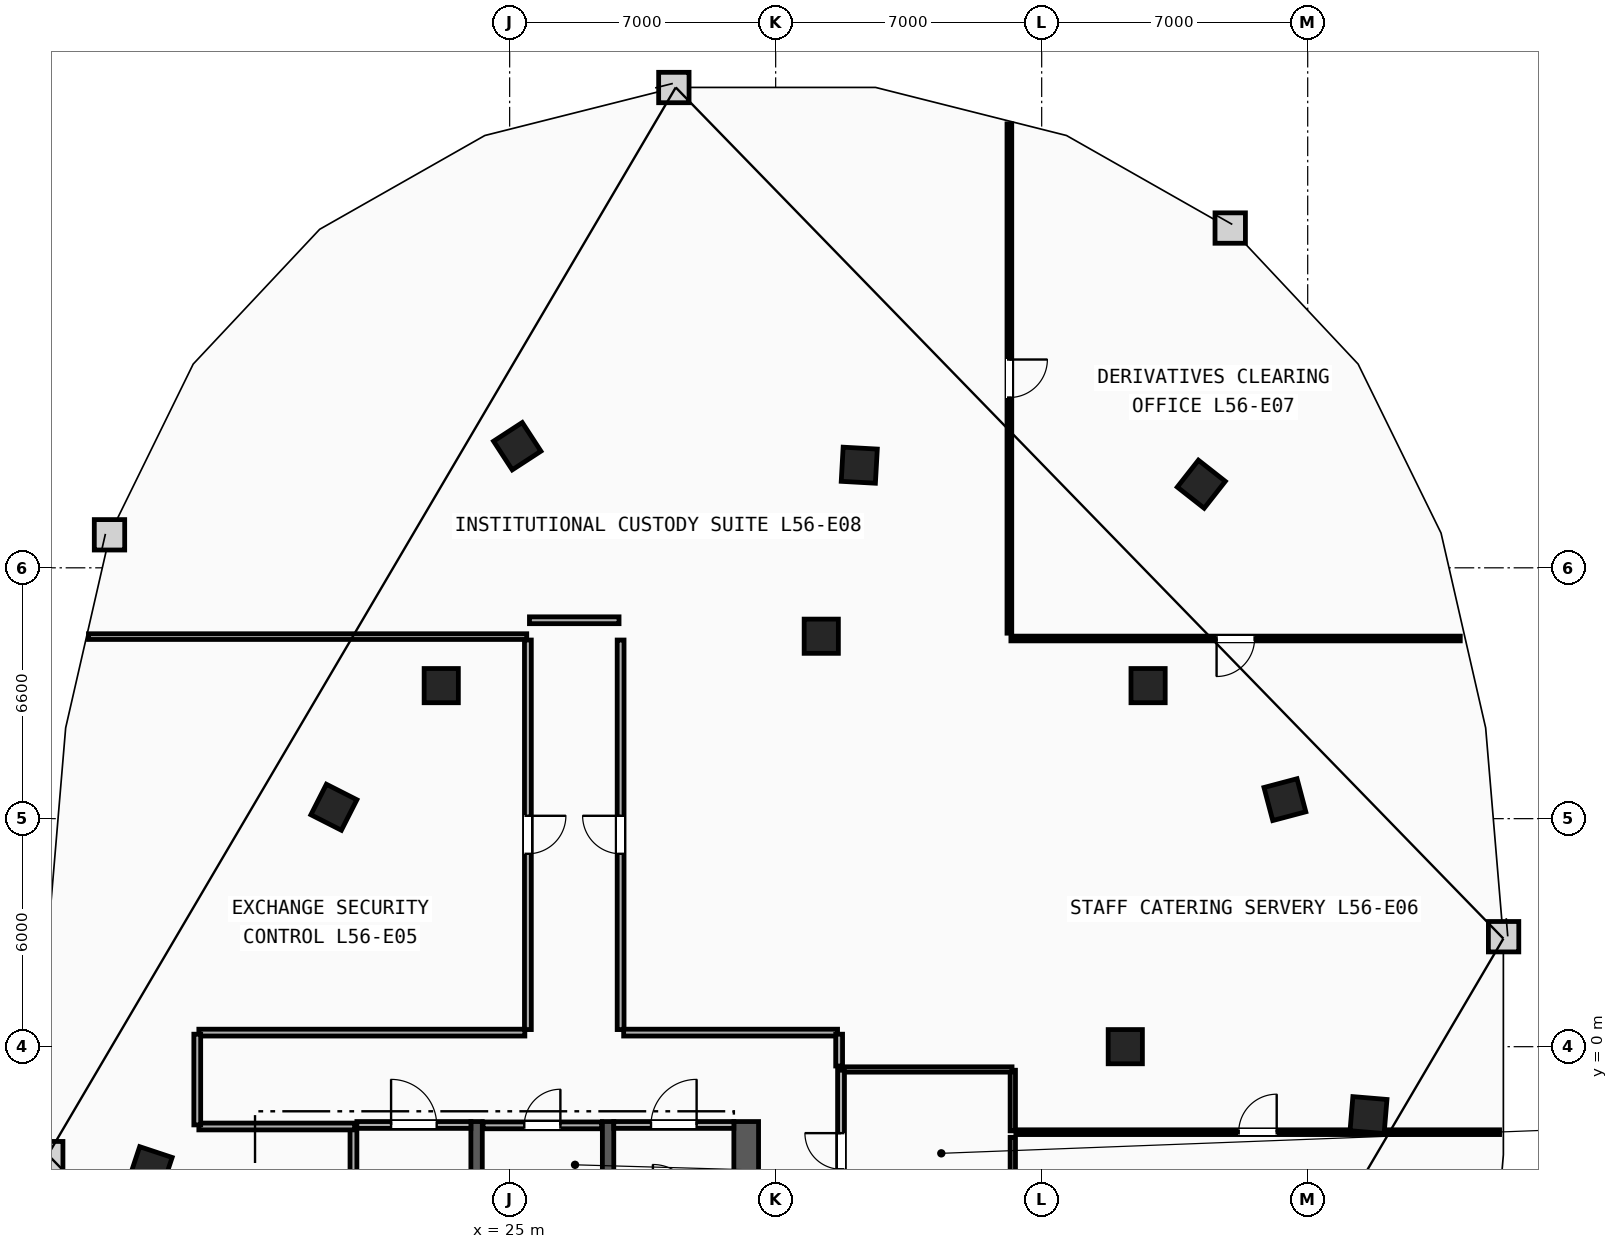
"""IFC4 building model, lengths in metres.
Left out: names, types, materials, properties, quantities, classifications, styles, units other than length and angle.
Written with IfcOpenShell. Run it as: python <this file> out.ifc"""

import sys

from ifc_helpers import new_model, si_unit, direction, frame, frame_2d, origin, origin_2d, place, context, subcontext, project, spatial, rectangle, extrude, element, fill, save


model = new_model("IFC4")
c1 = context("Model", 3, precision=1e-05, world=origin(), true_north=direction((0.0, 1.0)))
c2 = subcontext(c1, "Body", "Model", "MODEL_VIEW")
j1 = project(units=[si_unit("LENGTHUNIT", "METRE"), si_unit("PLANEANGLEUNIT", "RADIAN")], contexts=[c1])
p1 = place(None, origin())
s1 = spatial("IfcSite", under=j1, at=p1, CompositionType="ELEMENT")
p2 = place(p1, origin())
s2 = spatial("IfcBuilding", under=s1, at=p2, CompositionType="ELEMENT")
p3 = place(p2, frame((0.0, 0.0, 213.4)))
s3 = spatial("IfcBuildingStorey", under=s2, at=p3, CompositionType="ELEMENT", Elevation=213.4)
for number, where, z_axis, x_axis in (
    (1, (41.2, 0.0, 0.0), (0.0, 0.0, 1.0), (1.0, 0.0, 0.0)),
    (2, (41.8, 9.5, 0.0), (0.0, 0.0, 1.0), (1.0, 0.0, 0.0)),
    (3, (33.2, 10.8, 0.0), (0.0, 0.0, 1.0), (1.0, 0.0, 0.0)),
    (4, (23.2, 9.5, 0.0), (0.0, 0.0, 1.0), (1.0, 0.0, 0.0)),
    (5, (15.55, -3.2, 0.0), (0.0, 0.0, 1.0), (-0.315, -0.949, 0.0)),
    (6, (47.6, -1.8, 0.0), (0.0, 0.0, 1.0), (0.084, 0.997, 0.0)),
    (7, (45.4, 6.5, 0.0), (0.0, 0.0, 1.0), (-0.256, 0.967, 0.0)),
    (8, (43.2, 14.8, 0.0), (0.0, 0.0, 1.0), (-0.786, 0.618, 0.0)),
    (9, (34.2, 15.3, 0.0), (0.0, 0.0, 1.0), (-0.998, 0.055, 0.0)),
    (10, (25.2, 15.8, 0.0), (0.0, 0.0, 1.0), (-0.838, -0.546, 0.0)),
    (11, (20.375, 6.3, 0.0), (0.0, 0.0, 1.0), (-0.453, -0.892, 0.0)),
):
    element("IfcColumn", number, at=place(p3, frame(where, z_axis=z_axis, x_axis=x_axis)), inside=s3, PredefinedType="COLUMN", context=c2, shape_type="SweptSolid", body=[
        extrude(rectangle(XDim=0.9, YDim=0.9, at=origin_2d()), origin(), (0.0, 0.0, 1.0), 3.6),
    ])
p4 = place(p3, frame((31.225, -15.3, 0.0), z_axis=(0.0, 0.0, 1.0), x_axis=(0.0, 1.0, 0.0)))
e12 = element("IfcWall", 12, at=p4, inside=s3, PredefinedType="SHEAR", context=c2, shape_type="SweptSolid", body=[
    extrude(rectangle(XDim=13.33, YDim=0.65, at=frame_2d((6.665, 0.0))), origin(), (0.0, 0.0, 1.0), 3.34),
])
for number, where, z_axis, x_axis in (
    (13, (27.59, -12.65, 0.0), (0.0, 0.0, 1.0), (0.0, 1.0, 0.0)),
    (14, (24.13, -12.65, 0.0), (0.0, 0.0, 1.0), (0.0, 1.0, 0.0)),
):
    element("IfcWall", number, at=place(p3, frame(where, z_axis=z_axis, x_axis=x_axis)), inside=s3, PredefinedType="SHEAR", context=c2, shape_type="SweptSolid", body=[
        extrude(rectangle(XDim=10.68, YDim=0.3, at=frame_2d((5.34, 0.0))), origin(), (0.0, 0.0, 1.0), 3.34),
    ])
p5 = place(p3, frame((20.89, -7.45, 0.0), z_axis=(0.0, 0.0, 1.0), x_axis=(0.0, 1.0, 0.0)))
e15 = element("IfcWall", 15, at=p5, inside=s3, PredefinedType="PARTITIONING", context=c2, shape_type="SweptSolid", body=[
    extrude(rectangle(XDim=5.3, YDim=0.18, at=frame_2d((2.65, 0.0))), origin(), (0.0, 0.0, 1.0), 3.34),
])
p6 = place(p3, frame((20.98, -2.06, 0.0), z_axis=(0.0, 0.0, 1.0), x_axis=(1.0, 0.0, 0.0)))
e16 = element("IfcWall", 16, at=p6, inside=s3, PredefinedType="PARTITIONING", context=c2, shape_type="SweptSolid", body=[
    extrude(rectangle(XDim=3.0, YDim=0.18, at=frame_2d((1.5, 0.0))), origin(), (0.0, 0.0, 1.0), 3.34),
])
p7 = place(p6, frame((0.9, 0.0, 0.0)))
e17 = element("IfcOpeningElement", 17, at=p7, cuts=e16, PredefinedType="OPENING", context=c2, shape_type="SweptSolid", body=[
    extrude(rectangle(XDim=1.2, YDim=2.15, at=frame_2d((0.6, 1.075))), frame((0.0, 0.1, 0.0), z_axis=(0.0, -1.0, 0.0), x_axis=(1.0, 0.0, 0.0)), (0.0, 0.0, 1.0), 0.2),
])
p8 = place(p3, frame((27.74, -2.06, 0.0), z_axis=(0.0, 0.0, 1.0), x_axis=(1.0, 0.0, 0.0)))
e18 = element("IfcWall", 18, at=p8, inside=s3, PredefinedType="PARTITIONING", context=c2, shape_type="SweptSolid", body=[
    extrude(rectangle(XDim=3.16, YDim=0.18, at=frame_2d((1.58, 0.0))), origin(), (0.0, 0.0, 1.0), 3.34),
])
p9 = place(p8, frame((0.98, 0.0, 0.0)))
e19 = element("IfcOpeningElement", 19, at=p9, cuts=e18, PredefinedType="OPENING", context=c2, shape_type="SweptSolid", body=[
    extrude(rectangle(XDim=1.2, YDim=2.15, at=frame_2d((0.6, 1.075))), frame((0.0, 0.1, 0.0), z_axis=(0.0, -1.0, 0.0), x_axis=(1.0, 0.0, 0.0)), (0.0, 0.0, 1.0), 0.2),
])
p10 = place(p3, frame((24.3, -2.07, 0.0), z_axis=(0.0, 0.0, 1.0), x_axis=(1.0, 0.0, 0.0)))
e20 = element("IfcWall", 20, at=p10, inside=s3, PredefinedType="PARTITIONING", context=c2, shape_type="SweptSolid", body=[
    extrude(rectangle(XDim=3.12, YDim=0.18, at=frame_2d((1.56, 0.0))), origin(), (0.0, 0.0, 1.0), 3.34),
])
p11 = place(p10, frame((1.085, 0.0, 0.0)))
e21 = element("IfcOpeningElement", 21, at=p11, cuts=e20, PredefinedType="OPENING", context=c2, shape_type="SweptSolid", body=[
    extrude(rectangle(XDim=0.95, YDim=2.1, at=frame_2d((0.475, 1.05))), frame((0.0, 0.1, 0.0), z_axis=(0.0, -1.0, 0.0), x_axis=(1.0, 0.0, 0.0)), (0.0, 0.0, 1.0), 0.2),
])
p12 = place(p3, frame((38.24, -4.895, 0.0), z_axis=(0.0, 0.0, 1.0), x_axis=(0.0, 1.0, 0.0)))
e22 = element("IfcWall", 22, at=p12, inside=s3, PredefinedType="PARTITIONING", context=c2, shape_type="SweptSolid", body=[
    extrude(rectangle(XDim=2.51, YDim=0.14, at=frame_2d((1.255, 0.0))), origin(), (0.0, 0.0, 1.0), 3.34),
])
p13 = place(p3, frame((38.24, -2.215, 0.0), z_axis=(0.0, 0.0, 1.0), x_axis=(0.0, 1.0, 0.0)))
e23 = element("IfcWall", 23, at=p13, inside=s3, PredefinedType="PARTITIONING", context=c2, shape_type="SweptSolid", body=[
    extrude(rectangle(XDim=1.595, YDim=0.14, at=frame_2d((0.797, 0.0))), origin(), (0.0, 0.0, 1.0), 3.34),
])
p14 = place(p3, frame((33.74, -0.6, 0.0), z_axis=(0.0, 0.0, 1.0), x_axis=(1.0, 0.0, 0.0)))
e24 = element("IfcWall", 24, at=p14, inside=s3, PredefinedType="PARTITIONING", context=c2, shape_type="SweptSolid", body=[
    extrude(rectangle(XDim=4.48, YDim=0.14, at=frame_2d((2.24, 0.0))), origin(), (0.0, 0.0, 1.0), 3.34),
])
p15 = place(p3, frame((33.72, -4.88, 0.0), z_axis=(0.0, 0.0, 1.0), x_axis=(0.0, 1.0, 0.0)))
e25 = element("IfcWall", 25, at=p15, inside=s3, PredefinedType="PARTITIONING", context=c2, shape_type="SweptSolid", body=[
    extrude(rectangle(XDim=4.26, YDim=0.18, at=frame_2d((2.13, 0.0))), origin(), (0.0, 0.0, 1.0), 3.34),
])
p16 = place(p15, frame((1.655, 0.0, 0.0)))
e26 = element("IfcOpeningElement", 26, at=p16, cuts=e25, PredefinedType="OPENING", context=c2, shape_type="SweptSolid", body=[
    extrude(rectangle(XDim=0.95, YDim=2.1, at=frame_2d((0.475, 1.05))), frame((0.0, 0.1, 0.0), z_axis=(0.0, -1.0, 0.0), x_axis=(1.0, 0.0, 0.0)), (0.0, 0.0, 1.0), 0.2),
])
p17 = place(p3, frame((13.918, 10.79, 0.0), z_axis=(0.0, 0.0, 1.0), x_axis=(1.0, 0.0, 0.0)))
e27 = element("IfcWall", 27, at=p17, inside=s3, PredefinedType="PARTITIONING", context=c2, shape_type="SweptSolid", body=[
    extrude(rectangle(XDim=11.532, YDim=0.15, at=frame_2d((5.766, 0.0))), origin(), (0.0, 0.0, 1.0), 3.34),
])
p18 = place(p3, frame((25.48, 10.7, 0.0), z_axis=(0.0, 0.0, 1.0), x_axis=(0.0, -1.0, 0.0)))
e28 = element("IfcWall", 28, at=p18, inside=s3, PredefinedType="PARTITIONING", context=c2, shape_type="SweptSolid", body=[
    extrude(rectangle(XDim=10.25, YDim=0.18, at=frame_2d((5.125, 0.0))), origin(), (0.0, 0.0, 1.0), 3.34),
])
p19 = place(p18, frame((4.625, 0.0, 0.0)))
e29 = element("IfcOpeningElement", 29, at=p19, cuts=e28, PredefinedType="OPENING", context=c2, shape_type="SweptSolid", body=[
    extrude(rectangle(XDim=1.0, YDim=2.15, at=frame_2d((0.5, 1.075))), frame((0.0, 0.1, 0.0), z_axis=(0.0, -1.0, 0.0), x_axis=(1.0, 0.0, 0.0)), (0.0, 0.0, 1.0), 0.2),
])
p20 = place(p3, frame((25.4, 0.37, 0.0), z_axis=(0.0, 0.0, 1.0), x_axis=(-1.0, 0.0, 0.0)))
e30 = element("IfcWall", 30, at=p20, inside=s3, PredefinedType="PARTITIONING", context=c2, shape_type="SweptSolid", body=[
    extrude(rectangle(XDim=8.578, YDim=0.18, at=frame_2d((4.289, 0.0))), origin(), (0.0, 0.0, 1.0), 3.34),
])
p21 = place(p3, frame((16.822, -2.1, 0.0), z_axis=(0.0, 0.0, 1.0), x_axis=(1.0, 0.0, 0.0)))
e31 = element("IfcWall", 31, at=p21, inside=s3, PredefinedType="PARTITIONING", context=c2, shape_type="SweptSolid", body=[
    extrude(rectangle(XDim=4.098, YDim=0.18, at=frame_2d((2.049, 0.0))), origin(), (0.0, 0.0, 1.0), 3.34),
])
p22 = place(p3, frame((16.78, 0.329, 0.0), z_axis=(0.0, 0.0, 1.0), x_axis=(0.0, -1.0, 0.0)))
e32 = element("IfcWall", 32, at=p22, inside=s3, PredefinedType="PARTITIONING", context=c2, shape_type="SweptSolid", body=[
    extrude(rectangle(XDim=2.387, YDim=0.18, at=frame_2d((1.194, 0.0))), origin(), (0.0, 0.0, 1.0), 3.34),
])
p23 = place(p3, frame((27.92, 0.45, 0.0), z_axis=(0.0, 0.0, 1.0), x_axis=(0.0, 1.0, 0.0)))
e33 = element("IfcWall", 33, at=p23, inside=s3, PredefinedType="PARTITIONING", context=c2, shape_type="SweptSolid", body=[
    extrude(rectangle(XDim=10.25, YDim=0.18, at=frame_2d((5.125, 0.0))), origin(), (0.0, 0.0, 1.0), 3.34),
])
p24 = place(p23, frame((4.625, 0.0, 0.0)))
e34 = element("IfcOpeningElement", 34, at=p24, cuts=e33, PredefinedType="OPENING", context=c2, shape_type="SweptSolid", body=[
    extrude(rectangle(XDim=1.0, YDim=2.15, at=frame_2d((0.5, 1.075))), frame((0.0, 0.1, 0.0), z_axis=(0.0, -1.0, 0.0), x_axis=(1.0, 0.0, 0.0)), (0.0, 0.0, 1.0), 0.2),
])
p25 = place(p3, frame((33.628, 0.37, 0.0), z_axis=(0.0, 0.0, 1.0), x_axis=(-1.0, 0.0, 0.0)))
e35 = element("IfcWall", 35, at=p25, inside=s3, PredefinedType="PARTITIONING", context=c2, shape_type="SweptSolid", body=[
    extrude(rectangle(XDim=5.628, YDim=0.18, at=frame_2d((2.814, 0.0))), origin(), (0.0, 0.0, 1.0), 3.34),
])
p26 = place(p3, frame((33.67, -0.509, 0.0), z_axis=(0.0, 0.0, 1.0), x_axis=(0.0, 1.0, 0.0)))
e36 = element("IfcWall", 36, at=p26, inside=s3, PredefinedType="PARTITIONING", context=c2, shape_type="SweptSolid", body=[
    extrude(rectangle(XDim=0.837, YDim=0.18, at=frame_2d((0.418, 0.0))), origin(), (0.0, 0.0, 1.0), 3.34),
])
p27 = place(p3, frame((27.878, 11.22, 0.0), z_axis=(0.0, 0.0, 1.0), x_axis=(-1.0, 0.0, 0.0)))
e37 = element("IfcWall", 37, at=p27, inside=s3, PredefinedType="PARTITIONING", context=c2, shape_type="SweptSolid", body=[
    extrude(rectangle(XDim=2.357, YDim=0.18, at=frame_2d((1.178, 0.0))), origin(), (0.0, 0.0, 1.0), 3.34),
])
p28 = place(p3, frame((38.32, -2.25, 0.0), z_axis=(0.0, 0.0, 1.0), x_axis=(1.0, 0.0, 0.0)))
e38 = element("IfcWall", 38, at=p28, inside=s3, PredefinedType="PARTITIONING", context=c2, shape_type="SweptSolid", body=[
    extrude(rectangle(XDim=12.729, YDim=0.125, at=frame_2d((6.365, 0.0))), origin(), (0.0, 0.0, 1.0), 3.34),
])
p29 = place(p28, frame((5.865, 0.0, 0.0)))
e39 = element("IfcOpeningElement", 39, at=p29, cuts=e38, PredefinedType="OPENING", context=c2, shape_type="SweptSolid", body=[
    extrude(rectangle(XDim=1.0, YDim=2.15, at=frame_2d((0.5, 1.075))), frame((0.0, 0.073, 0.0), z_axis=(0.0, -1.0, 0.0), x_axis=(1.0, 0.0, 0.0)), (0.0, 0.0, 1.0), 0.145),
])
p30 = place(p3, frame((50.015, 10.74, 0.0), z_axis=(0.0, 0.0, 1.0), x_axis=(-1.0, 0.0, 0.0)))
e40 = element("IfcWall", 40, at=p30, inside=s3, PredefinedType="PARTITIONING", context=c2, shape_type="SweptSolid", body=[
    extrude(rectangle(XDim=11.825, YDim=0.125, at=frame_2d((5.913, 0.0))), origin(), (0.0, 0.0, 1.0), 3.34),
])
p31 = place(p30, frame((5.412, 0.0, 0.0)))
e41 = element("IfcOpeningElement", 41, at=p31, cuts=e40, PredefinedType="OPENING", context=c2, shape_type="SweptSolid", body=[
    extrude(rectangle(XDim=1.0, YDim=2.15, at=frame_2d((0.5, 1.075))), frame((0.0, 0.073, 0.0), z_axis=(0.0, -1.0, 0.0), x_axis=(1.0, 0.0, 0.0)), (0.0, 0.0, 1.0), 0.145),
])
p32 = place(p3, frame((38.15, 24.281, 0.0), z_axis=(0.0, 0.0, 1.0), x_axis=(0.0, -1.0, 0.0)))
e42 = element("IfcWall", 42, at=p32, inside=s3, PredefinedType="PARTITIONING", context=c2, shape_type="SweptSolid", body=[
    extrude(rectangle(XDim=13.401, YDim=0.125, at=frame_2d((6.701, 0.0))), origin(), (0.0, 0.0, 1.0), 3.34),
])
p33 = place(p32, frame((6.201, 0.0, 0.0)))
e43 = element("IfcOpeningElement", 43, at=p33, cuts=e42, PredefinedType="OPENING", context=c2, shape_type="SweptSolid", body=[
    extrude(rectangle(XDim=1.0, YDim=2.15, at=frame_2d((0.5, 1.075))), frame((0.0, 0.073, 0.0), z_axis=(0.0, -1.0, 0.0), x_axis=(1.0, 0.0, 0.0)), (0.0, 0.0, 1.0), 0.145),
])
p34 = place(p7, origin())
e44 = element("IfcDoor", 44, at=p34, inside=s3, OperationType="SINGLE_SWING_LEFT", PredefinedType="DOOR", context=c2, shape_type="SweptSolid", body=[
    extrude(rectangle(XDim=1.2, YDim=2.15, at=frame_2d((0.6, 1.075))), frame((0.0, 0.025, 0.0), z_axis=(0.0, -1.0, 0.0), x_axis=(1.0, 0.0, 0.0)), (0.0, 0.0, 1.0), 0.05),
])
fill(e17, e44)
p35 = place(p9, origin())
e45 = element("IfcDoor", 45, at=p35, inside=s3, OperationType="SINGLE_SWING_RIGHT", PredefinedType="DOOR", context=c2, shape_type="SweptSolid", body=[
    extrude(rectangle(XDim=1.2, YDim=2.15, at=frame_2d((0.6, 1.075))), frame((0.0, 0.025, 0.0), z_axis=(0.0, -1.0, 0.0), x_axis=(1.0, 0.0, 0.0)), (0.0, 0.0, 1.0), 0.05),
])
fill(e19, e45)
p36 = place(p33, origin())
e46 = element("IfcDoor", 46, at=p36, inside=s3, OperationType="SINGLE_SWING_LEFT", PredefinedType="DOOR", context=c2, shape_type="SweptSolid", body=[
    extrude(rectangle(XDim=1.0, YDim=2.15, at=frame_2d((0.5, 1.075))), frame((0.0, 0.025, 0.0), z_axis=(0.0, -1.0, 0.0), x_axis=(1.0, 0.0, 0.0)), (0.0, 0.0, 1.0), 0.05),
])
fill(e43, e46)
p37 = place(p29, origin())
e47 = element("IfcDoor", 47, at=p37, inside=s3, OperationType="SINGLE_SWING_RIGHT", PredefinedType="DOOR", context=c2, shape_type="SweptSolid", body=[
    extrude(rectangle(XDim=1.0, YDim=2.15, at=frame_2d((0.5, 1.075))), frame((0.0, 0.025, 0.0), z_axis=(0.0, -1.0, 0.0), x_axis=(1.0, 0.0, 0.0)), (0.0, 0.0, 1.0), 0.05),
])
fill(e39, e47)
p38 = place(p31, origin())
e48 = element("IfcDoor", 48, at=p38, inside=s3, OperationType="SINGLE_SWING_RIGHT", PredefinedType="DOOR", context=c2, shape_type="SweptSolid", body=[
    extrude(rectangle(XDim=1.0, YDim=2.15, at=frame_2d((0.5, 1.075))), frame((0.0, 0.025, 0.0), z_axis=(0.0, -1.0, 0.0), x_axis=(1.0, 0.0, 0.0)), (0.0, 0.0, 1.0), 0.05),
])
fill(e41, e48)
p39 = place(p19, origin())
e49 = element("IfcDoor", 49, at=p39, inside=s3, OperationType="SINGLE_SWING_LEFT", PredefinedType="DOOR", context=c2, shape_type="SweptSolid", body=[
    extrude(rectangle(XDim=1.0, YDim=2.15, at=frame_2d((0.5, 1.075))), frame((0.0, 0.025, 0.0), z_axis=(0.0, -1.0, 0.0), x_axis=(1.0, 0.0, 0.0)), (0.0, 0.0, 1.0), 0.05),
])
fill(e29, e49)
p40 = place(p24, origin())
e50 = element("IfcDoor", 50, at=p40, inside=s3, OperationType="SINGLE_SWING_RIGHT", PredefinedType="DOOR", context=c2, shape_type="SweptSolid", body=[
    extrude(rectangle(XDim=1.0, YDim=2.15, at=frame_2d((0.5, 1.075))), frame((0.0, 0.025, 0.0), z_axis=(0.0, -1.0, 0.0), x_axis=(1.0, 0.0, 0.0)), (0.0, 0.0, 1.0), 0.05),
])
fill(e34, e50)
p41 = place(p16, origin())
e51 = element("IfcDoor", 51, at=p41, inside=s3, OperationType="SINGLE_SWING_RIGHT", PredefinedType="DOOR", context=c2, shape_type="SweptSolid", body=[
    extrude(rectangle(XDim=0.95, YDim=2.1, at=frame_2d((0.475, 1.05))), frame((0.0, 0.025, 0.0), z_axis=(0.0, -1.0, 0.0), x_axis=(1.0, 0.0, 0.0)), (0.0, 0.0, 1.0), 0.05),
])
fill(e26, e51)
p42 = place(p11, origin())
e52 = element("IfcDoor", 52, at=p42, inside=s3, OperationType="SINGLE_SWING_RIGHT", PredefinedType="DOOR", context=c2, shape_type="SweptSolid", body=[
    extrude(rectangle(XDim=0.95, YDim=2.1, at=frame_2d((0.475, 1.05))), frame((0.0, 0.025, 0.0), z_axis=(0.0, -1.0, 0.0), x_axis=(1.0, 0.0, 0.0)), (0.0, 0.0, 1.0), 0.05),
])
fill(e21, e52)
save(model, sys.argv[1])
